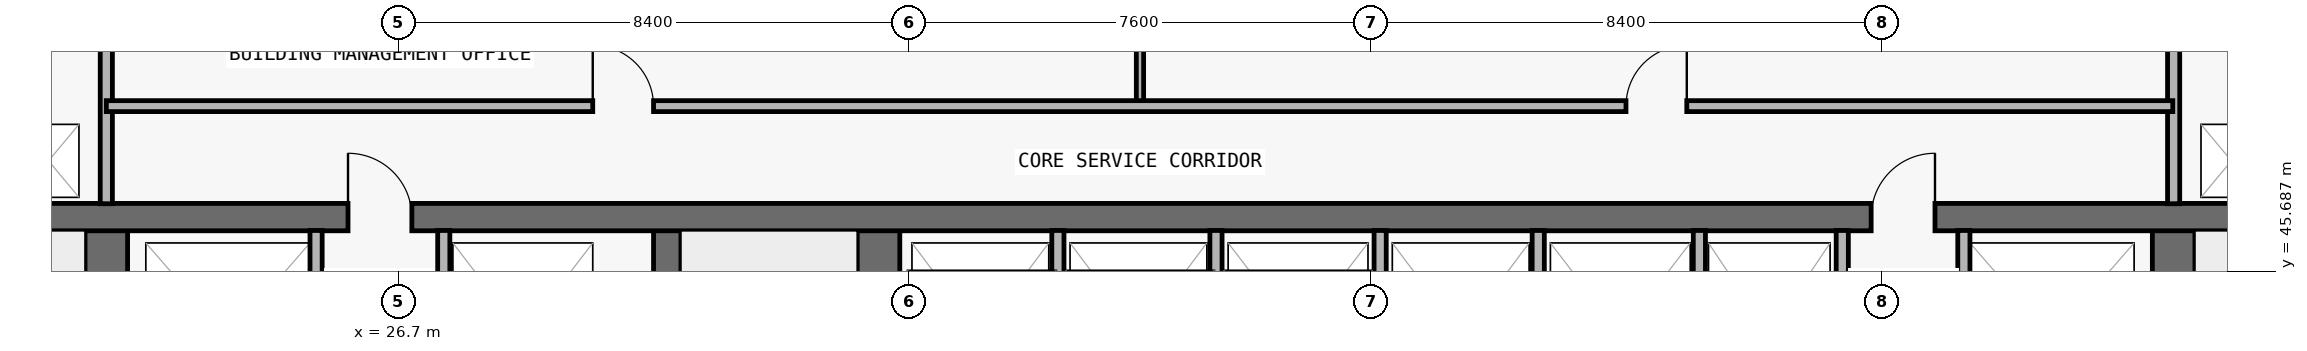
"""IFC4 building model, lengths in metres.
Left out: names, types, materials, properties, quantities, classifications, styles, units other than length and angle.
Written with IfcOpenShell. Run it as: python <this file> out.ifc"""

import sys

from ifc_helpers import new_model, si_unit, direction, frame, frame_2d, origin, place, context, subcontext, project, spatial, rectangle, extrude, element, fill, save


model = new_model("IFC4")
c1 = context("Model", 3, precision=1e-05, world=origin(), true_north=direction((0.0, 1.0)))
c2 = subcontext(c1, "Body", "Model", "MODEL_VIEW")
j1 = project(units=[si_unit("LENGTHUNIT", "METRE"), si_unit("PLANEANGLEUNIT", "RADIAN")], contexts=[c1])
p1 = place(None, origin())
s1 = spatial("IfcSite", under=j1, at=p1, CompositionType="ELEMENT")
p2 = place(p1, origin())
s2 = spatial("IfcBuilding", under=s1, at=p2, CompositionType="ELEMENT")
p3 = place(p2, frame((0.0, 0.0, 30.0)))
s3 = spatial("IfcBuildingStorey", under=s2, at=p3, CompositionType="ELEMENT", Elevation=30.0)
p4 = place(p3, frame((21.9, 36.9, 0.0), z_axis=(0.0, 0.0, 1.0), x_axis=(0.0, 1.0, 0.0)))
e1 = element("IfcWall", 1, at=p4, inside=s3, PredefinedType="SHEAR", context=c2, shape_type="SweptSolid", body=[
    extrude(rectangle(XDim=9.675, YDim=0.7, at=frame_2d((4.837, 0.0))), origin(), (0.0, 0.0, 1.0), 3.05),
])
p5 = place(p4, frame((0.65, 0.0, 0.0)))
e2 = element("IfcOpeningElement", 2, at=p5, cuts=e1, PredefinedType="OPENING", context=c2, shape_type="SweptSolid", body=[
    extrude(rectangle(XDim=1.1, YDim=2.15, at=frame_2d((0.55, 1.075))), frame((0.0, 0.36, 0.0), z_axis=(0.0, -1.0, 0.0), x_axis=(1.0, 0.0, 0.0)), (0.0, 0.0, 1.0), 0.72),
])
p6 = place(p3, frame((55.9, 36.9, 0.0), z_axis=(0.0, 0.0, 1.0), x_axis=(0.0, 1.0, 0.0)))
e3 = element("IfcWall", 3, at=p6, inside=s3, PredefinedType="SHEAR", context=c2, shape_type="SweptSolid", body=[
    extrude(rectangle(XDim=9.675, YDim=0.7, at=frame_2d((4.837, 0.0))), origin(), (0.0, 0.0, 1.0), 3.05),
])
p7 = place(p6, frame((0.65, 0.0, 0.0)))
e4 = element("IfcOpeningElement", 4, at=p7, cuts=e3, PredefinedType="OPENING", context=c2, shape_type="SweptSolid", body=[
    extrude(rectangle(XDim=1.1, YDim=2.15, at=frame_2d((0.55, 1.075))), frame((0.0, 0.36, 0.0), z_axis=(0.0, -1.0, 0.0), x_axis=(1.0, 0.0, 0.0)), (0.0, 0.0, 1.0), 0.72),
])
p8 = place(p3, frame((31.125, 36.9, 0.0), z_axis=(0.0, 0.0, 1.0), x_axis=(0.0, 1.0, 0.0)))
e5 = element("IfcWall", 5, at=p8, inside=s3, PredefinedType="SHEAR", context=c2, shape_type="SweptSolid", body=[
    extrude(rectangle(XDim=9.675, YDim=0.45, at=frame_2d((4.837, 0.0))), origin(), (0.0, 0.0, 1.0), 3.05),
])
p9 = place(p3, frame((34.6, 36.9, 0.0), z_axis=(0.0, 0.0, 1.0), x_axis=(0.0, 1.0, 0.0)))
e6 = element("IfcWall", 6, at=p9, inside=s3, PredefinedType="SHEAR", context=c2, shape_type="SweptSolid", body=[
    extrude(rectangle(XDim=9.675, YDim=0.7, at=frame_2d((4.837, 0.0))), origin(), (0.0, 0.0, 1.0), 3.05),
])
p10 = place(p3, frame((18.2, 46.575, 0.0), z_axis=(0.0, 0.0, 1.0), x_axis=(1.0, 0.0, 0.0)))
e7 = element("IfcWall", 7, at=p10, inside=s3, PredefinedType="SHEAR", context=c2, shape_type="SweptSolid", body=[
    extrude(rectangle(XDim=41.4, YDim=0.45, at=frame_2d((20.7, 0.0))), origin(), (0.0, 0.0, 1.0), 3.05),
])
p11 = place(p10, frame((7.675, 0.0, 0.0)))
e8 = element("IfcOpeningElement", 8, at=p11, cuts=e7, PredefinedType="OPENING", context=c2, shape_type="SweptSolid", body=[
    extrude(rectangle(XDim=1.05, YDim=2.15, at=frame_2d((0.525, 1.075))), frame((0.0, 0.235, 0.0), z_axis=(0.0, -1.0, 0.0), x_axis=(1.0, 0.0, 0.0)), (0.0, 0.0, 1.0), 0.47),
])
p12 = place(p10, frame((32.725, 0.0, 0.0)))
e9 = element("IfcOpeningElement", 9, at=p12, cuts=e7, PredefinedType="OPENING", context=c2, shape_type="SweptSolid", body=[
    extrude(rectangle(XDim=1.05, YDim=2.15, at=frame_2d((0.525, 1.075))), frame((0.0, 0.235, 0.0), z_axis=(0.0, -1.0, 0.0), x_axis=(1.0, 0.0, 0.0)), (0.0, 0.0, 1.0), 0.47),
])
p13 = place(p3, frame((21.9, 46.795, 0.0), z_axis=(0.0, 0.0, 1.0), x_axis=(0.0, 1.0, 0.0)))
e10 = element("IfcWall", 10, at=p13, inside=s3, PredefinedType="PARTITIONING", context=c2, shape_type="SweptSolid", body=[
    extrude(rectangle(XDim=3.06, YDim=0.2, at=frame_2d((1.53, 0.0))), origin(), (0.0, 0.0, 1.0), 3.05),
])
for number, where, z_axis, x_axis in (
    (11, (25.35, 43.17, 0.0), (0.0, 0.0, 1.0), (0.0, 1.0, 0.0)),
    (12, (27.45, 43.17, 0.0), (0.0, 0.0, 1.0), (0.0, 1.0, 0.0)),
    (13, (37.55, 43.17, 0.0), (0.0, 0.0, 1.0), (0.0, 1.0, 0.0)),
):
    element("IfcWall", number, at=place(p3, frame(where, z_axis=z_axis, x_axis=x_axis)), inside=s3, PredefinedType="PARTITIONING", context=c2, shape_type="SweptSolid", body=[
        extrude(rectangle(XDim=3.185, YDim=0.2, at=frame_2d((1.593, 0.0))), origin(), (0.0, 0.0, 1.0), 3.05),
    ])
p14 = place(p3, frame((38.9, 48.4, 0.0), z_axis=(0.0, 0.0, 1.0), x_axis=(0.0, 1.0, 0.0)))
e14 = element("IfcWall", 14, at=p14, inside=s3, PredefinedType="PARTITIONING", context=c2, shape_type="SweptSolid", body=[
    extrude(rectangle(XDim=1.455, YDim=0.12, at=frame_2d((0.728, 0.0))), origin(), (0.0, 0.0, 1.0), 3.05),
])
for number, where, z_axis, x_axis in (
    (15, (40.15, 43.17, 0.0), (0.0, 0.0, 1.0), (0.0, 1.0, 0.0)),
    (16, (42.85, 43.17, 0.0), (0.0, 0.0, 1.0), (0.0, 1.0, 0.0)),
    (17, (45.45, 43.17, 0.0), (0.0, 0.0, 1.0), (0.0, 1.0, 0.0)),
    (18, (48.1, 43.17, 0.0), (0.0, 0.0, 1.0), (0.0, 1.0, 0.0)),
    (19, (50.45, 43.17, 0.0), (0.0, 0.0, 1.0), (0.0, 1.0, 0.0)),
    (20, (52.45, 43.17, 0.0), (0.0, 0.0, 1.0), (0.0, 1.0, 0.0)),
):
    element("IfcWall", number, at=place(p3, frame(where, z_axis=z_axis, x_axis=x_axis)), inside=s3, PredefinedType="PARTITIONING", context=c2, shape_type="SweptSolid", body=[
        extrude(rectangle(XDim=3.185, YDim=0.2, at=frame_2d((1.593, 0.0))), origin(), (0.0, 0.0, 1.0), 3.05),
    ])
p15 = place(p3, frame((55.9, 46.795, 0.0), z_axis=(0.0, 0.0, 1.0), x_axis=(0.0, 1.0, 0.0)))
e21 = element("IfcWall", 21, at=p15, inside=s3, PredefinedType="PARTITIONING", context=c2, shape_type="SweptSolid", body=[
    extrude(rectangle(XDim=3.06, YDim=0.2, at=frame_2d((1.53, 0.0))), origin(), (0.0, 0.0, 1.0), 3.05),
])
p16 = place(p3, frame((21.9, 48.4, 0.0), z_axis=(0.0, 0.0, 1.0), x_axis=(1.0, 0.0, 0.0)))
e22 = element("IfcWall", 22, at=p16, inside=s3, PredefinedType="PARTITIONING", context=c2, shape_type="SweptSolid", body=[
    extrude(rectangle(XDim=33.986, YDim=0.18, at=frame_2d((16.993, 0.0))), origin(), (0.0, 0.0, 1.0), 3.05),
])
p17 = place(p16, frame((8.0, 0.0, 0.0)))
e23 = element("IfcOpeningElement", 23, at=p17, cuts=e22, PredefinedType="OPENING", context=c2, shape_type="SweptSolid", body=[
    extrude(rectangle(XDim=1.0, YDim=2.2, at=frame_2d((0.5, 1.1))), frame((0.0, 0.1, 0.0), z_axis=(0.0, -1.0, 0.0), x_axis=(1.0, 0.0, 0.0)), (0.0, 0.0, 1.0), 0.2),
])
p18 = place(p16, frame((24.993, 0.0, 0.0)))
e24 = element("IfcOpeningElement", 24, at=p18, cuts=e22, PredefinedType="OPENING", context=c2, shape_type="SweptSolid", body=[
    extrude(rectangle(XDim=1.0, YDim=2.2, at=frame_2d((0.5, 1.1))), frame((0.0, 0.1, 0.0), z_axis=(0.0, -1.0, 0.0), x_axis=(1.0, 0.0, 0.0)), (0.0, 0.0, 1.0), 0.2),
])
p19 = place(p11, origin())
e25 = element("IfcDoor", 25, at=p19, inside=s3, OperationType="SINGLE_SWING_LEFT", PredefinedType="DOOR", context=c2, shape_type="SweptSolid", body=[
    extrude(rectangle(XDim=1.05, YDim=2.15, at=frame_2d((0.525, 1.075))), frame((0.0, 0.025, 0.0), z_axis=(0.0, -1.0, 0.0), x_axis=(1.0, 0.0, 0.0)), (0.0, 0.0, 1.0), 0.05),
])
fill(e8, e25)
p20 = place(p12, origin())
e26 = element("IfcDoor", 26, at=p20, inside=s3, OperationType="SINGLE_SWING_RIGHT", PredefinedType="DOOR", context=c2, shape_type="SweptSolid", body=[
    extrude(rectangle(XDim=1.05, YDim=2.15, at=frame_2d((0.525, 1.075))), frame((0.0, 0.025, 0.0), z_axis=(0.0, -1.0, 0.0), x_axis=(1.0, 0.0, 0.0)), (0.0, 0.0, 1.0), 0.05),
])
fill(e9, e26)
p21 = place(p17, origin())
e27 = element("IfcDoor", 27, at=p21, inside=s3, OperationType="SINGLE_SWING_LEFT", PredefinedType="DOOR", context=c2, shape_type="SweptSolid", body=[
    extrude(rectangle(XDim=1.0, YDim=2.2, at=frame_2d((0.5, 1.1))), frame((0.0, 0.025, 0.0), z_axis=(0.0, -1.0, 0.0), x_axis=(1.0, 0.0, 0.0)), (0.0, 0.0, 1.0), 0.05),
])
fill(e23, e27)
p22 = place(p18, origin())
e28 = element("IfcDoor", 28, at=p22, inside=s3, OperationType="SINGLE_SWING_RIGHT", PredefinedType="DOOR", context=c2, shape_type="SweptSolid", body=[
    extrude(rectangle(XDim=1.0, YDim=2.2, at=frame_2d((0.5, 1.1))), frame((0.0, 0.025, 0.0), z_axis=(0.0, -1.0, 0.0), x_axis=(1.0, 0.0, 0.0)), (0.0, 0.0, 1.0), 0.05),
])
fill(e24, e28)
save(model, sys.argv[1])
